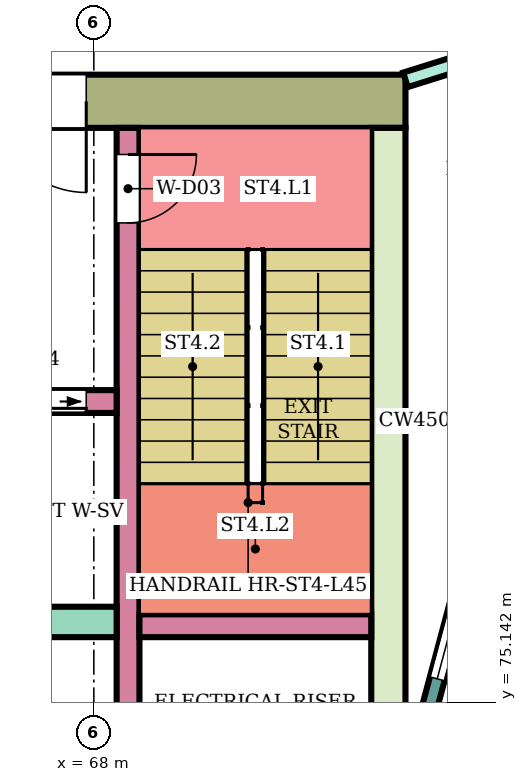
"""IFC4 building model, lengths in metres.
Left out: names, types, materials, properties, quantities, classifications, styles, units other than length and angle.
Written with IfcOpenShell. Run it as: python <this file> out.ifc"""

import sys

from ifc_helpers import new_model, si_unit, direction, frame, frame_2d, origin, place, context, subcontext, project, spatial, rectangle, extrude, element, fill, save


model = new_model("IFC4")
c1 = context("Model", 3, precision=1e-05, world=origin(), true_north=direction((0.0, 1.0)))
c2 = subcontext(c1, "Body", "Model", "MODEL_VIEW")
j1 = project(units=[si_unit("LENGTHUNIT", "METRE"), si_unit("PLANEANGLEUNIT", "RADIAN")], contexts=[c1])
p1 = place(None, origin())
s1 = spatial("IfcSite", under=j1, at=p1, CompositionType="ELEMENT")
p2 = place(p1, origin())
s2 = spatial("IfcBuilding", under=s1, at=p2, CompositionType="ELEMENT")
p3 = place(p2, frame((0.0, 0.0, 194.6)))
s3 = spatial("IfcBuildingStorey", under=s2, at=p3, CompositionType="ELEMENT", Elevation=194.6)
p4 = place(p3, frame((72.1, 83.05, 0.0), z_axis=(0.0, 0.0, 1.0), x_axis=(-1.0, 0.0, 0.0)))
e1 = element("IfcWall", 1, at=p4, inside=s3, PredefinedType="SHEAR", context=c2, shape_type="SweptSolid", body=[
    extrude(rectangle(XDim=14.8, YDim=0.7, at=frame_2d((7.4, 0.0))), origin(), (0.0, 0.0, 1.0), 3.78),
])
p5 = place(p4, frame((4.2, 0.0, 0.0)))
e2 = element("IfcOpeningElement", 2, at=p5, cuts=e1, PredefinedType="OPENING", context=c2, shape_type="SweptSolid", body=[
    extrude(rectangle(XDim=2.4, YDim=2.4, at=frame_2d((1.2, 1.2))), frame((0.0, 0.36, 0.0), z_axis=(0.0, -1.0, 0.0), x_axis=(1.0, 0.0, 0.0)), (0.0, 0.0, 1.0), 0.72),
])
p6 = place(p3, frame((71.875, 82.7, 0.0), z_axis=(0.0, 0.0, 1.0), x_axis=(0.0, -1.0, 0.0)))
e3 = element("IfcWall", 3, at=p6, inside=s3, PredefinedType="SHEAR", context=c2, shape_type="SweptSolid", body=[
    extrude(rectangle(XDim=7.7, YDim=0.45, at=frame_2d((3.85, 0.0))), origin(), (0.0, 0.0, 1.0), 3.78),
])
p7 = place(p3, frame((68.45, 82.7, 0.0), z_axis=(0.0, 0.0, 1.0), x_axis=(0.0, -1.0, 0.0)))
e4 = element("IfcWall", 4, at=p7, inside=s3, PredefinedType="SHEAR", context=c2, shape_type="SweptSolid", body=[
    extrude(rectangle(XDim=7.7, YDim=0.3, at=frame_2d((3.85, 0.0))), origin(), (0.0, 0.0, 1.0), 3.78),
])
p8 = place(p7, frame((0.35, 0.0, 0.0)))
e5 = element("IfcOpeningElement", 5, at=p8, cuts=e4, PredefinedType="OPENING", context=c2, shape_type="SweptSolid", body=[
    extrude(rectangle(XDim=0.9, YDim=2.1, at=frame_2d((0.45, 1.05))), frame((0.0, 0.16, 0.0), z_axis=(0.0, -1.0, 0.0), x_axis=(1.0, 0.0, 0.0)), (0.0, 0.0, 1.0), 0.32),
])
p9 = place(p3, frame((71.65, 76.15, 0.0), z_axis=(0.0, 0.0, 1.0), x_axis=(-1.0, 0.0, 0.0)))
e6 = element("IfcWall", 6, at=p9, inside=s3, PredefinedType="SHEAR", context=c2, shape_type="SweptSolid", body=[
    extrude(rectangle(XDim=3.05, YDim=0.3, at=frame_2d((1.525, 0.0))), origin(), (0.0, 0.0, 1.0), 3.78),
])
p10 = place(p3, frame((68.3, 76.2, 0.0), z_axis=(0.0, 0.0, 1.0), x_axis=(-1.0, 0.0, 0.0)))
e7 = element("IfcWall", 7, at=p10, inside=s3, PredefinedType="SHEAR", context=c2, shape_type="SweptSolid", body=[
    extrude(rectangle(XDim=11.0, YDim=0.4, at=frame_2d((5.5, 0.0))), origin(), (0.0, 0.0, 1.0), 3.78),
])
p11 = place(p3, frame((68.3, 79.1, 0.0), z_axis=(0.0, 0.0, 1.0), x_axis=(-1.0, 0.0, 0.0)))
e8 = element("IfcWall", 8, at=p11, inside=s3, PredefinedType="SHEAR", context=c2, shape_type="SweptSolid", body=[
    extrude(rectangle(XDim=11.0, YDim=0.3, at=frame_2d((5.5, 0.0))), origin(), (0.0, 0.0, 1.0), 3.78),
])
p12 = place(p11, frame((0.4, 0.0, 0.0)))
e9 = element("IfcOpeningElement", 9, at=p12, cuts=e8, PredefinedType="OPENING", context=c2, shape_type="SweptSolid", body=[
    extrude(rectangle(XDim=1.4, YDim=2.1, at=frame_2d((0.7, 1.05))), frame((0.0, 0.16, 0.0), z_axis=(0.0, -1.0, 0.0), x_axis=(1.0, 0.0, 0.0)), (0.0, 0.0, 1.0), 0.32),
])
p13 = place(p11, frame((3.0, 0.0, 0.0)))
e10 = element("IfcOpeningElement", 10, at=p13, cuts=e8, PredefinedType="OPENING", context=c2, shape_type="SweptSolid", body=[
    extrude(rectangle(XDim=1.2, YDim=2.1, at=frame_2d((0.6, 1.05))), frame((0.0, 0.16, 0.0), z_axis=(0.0, -1.0, 0.0), x_axis=(1.0, 0.0, 0.0)), (0.0, 0.0, 1.0), 0.32),
])
p14 = place(p11, frame((5.3, 0.0, 0.0)))
e11 = element("IfcOpeningElement", 11, at=p14, cuts=e8, PredefinedType="OPENING", context=c2, shape_type="SweptSolid", body=[
    extrude(rectangle(XDim=0.9, YDim=2.1, at=frame_2d((0.45, 1.05))), frame((0.0, 0.16, 0.0), z_axis=(0.0, -1.0, 0.0), x_axis=(1.0, 0.0, 0.0)), (0.0, 0.0, 1.0), 0.32),
])
p15 = place(p11, frame((8.3, 0.0, 0.0)))
e12 = element("IfcOpeningElement", 12, at=p15, cuts=e8, PredefinedType="OPENING", context=c2, shape_type="SweptSolid", body=[
    extrude(rectangle(XDim=0.9, YDim=2.1, at=frame_2d((0.45, 1.05))), frame((0.0, 0.16, 0.0), z_axis=(0.0, -1.0, 0.0), x_axis=(1.0, 0.0, 0.0)), (0.0, 0.0, 1.0), 0.32),
])
p16 = place(p3, frame((73.415, 78.802, 0.0), z_axis=(0.0, 0.0, 1.0), x_axis=(-0.258789828301, -0.965933654434, 0.0)))
e13 = element("IfcWall", 13, at=p16, inside=s3, PredefinedType="NOTDEFINED", context=c2, shape_type="SweptSolid", body=[
    extrude(rectangle(XDim=3.936, YDim=0.2, at=frame_2d((1.968, 0.0))), origin(), (0.0, 0.0, 1.0), 4.1),
])
p17 = place(p16, frame((0.468, 0.0, 0.9)))
e14 = element("IfcOpeningElement", 14, at=p17, cuts=e13, PredefinedType="OPENING", context=c2, shape_type="SweptSolid", body=[
    extrude(rectangle(XDim=3.0, YDim=2.3, at=frame_2d((1.5, 1.15))), frame((0.0, 0.11, 0.0), z_axis=(0.0, -1.0, 0.0), x_axis=(1.0, 0.0, 0.0)), (0.0, 0.0, 1.0), 0.22),
])
p18 = place(p3, frame((72.1, 83.332, 0.0), z_axis=(0.0, 0.0, 1.0), x_axis=(0.954233106619, 0.299063836383, 0.0)))
e15 = element("IfcWall", 15, at=p18, inside=s3, PredefinedType="PARTITIONING", context=c2, shape_type="SweptSolid", body=[
    extrude(rectangle(XDim=2.414, YDim=0.2, at=frame_2d((1.207, 0.0))), origin(), (0.0, 0.0, 1.0), 3.65),
])
p19 = place(p18, frame((0.762, 0.0, 0.0)))
e16 = element("IfcOpeningElement", 16, at=p19, cuts=e15, PredefinedType="OPENING", context=c2, shape_type="SweptSolid", body=[
    extrude(rectangle(XDim=0.9, YDim=2.1, at=frame_2d((0.45, 1.05))), frame((0.0, 0.11, 0.0), z_axis=(0.0, -1.0, 0.0), x_axis=(1.0, 0.0, 0.0)), (0.0, 0.0, 1.0), 0.22),
])
p20 = place(p17, origin())
e17 = element("IfcWindow", 17, at=p20, inside=s3, PartitioningType="SINGLE_PANEL", PredefinedType="WINDOW", context=c2, shape_type="SweptSolid", body=[
    extrude(rectangle(XDim=3.0, YDim=2.3, at=frame_2d((1.5, 1.15))), frame((0.0, 0.03, 0.0), z_axis=(0.0, -1.0, 0.0), x_axis=(1.0, 0.0, 0.0)), (0.0, 0.0, 1.0), 0.06),
])
fill(e14, e17)
p21 = place(p8, origin())
e18 = element("IfcDoor", 18, at=p21, inside=s3, OperationType="SINGLE_SWING_LEFT", PredefinedType="DOOR", context=c2, shape_type="SweptSolid", body=[
    extrude(rectangle(XDim=0.9, YDim=2.1, at=frame_2d((0.45, 1.05))), frame((0.0, 0.025, 0.0), z_axis=(0.0, -1.0, 0.0), x_axis=(1.0, 0.0, 0.0)), (0.0, 0.0, 1.0), 0.05),
])
fill(e5, e18)
p22 = place(p12, origin())
e19 = element("IfcDoor", 19, at=p22, inside=s3, OperationType="DOUBLE_DOOR_SLIDING", PredefinedType="DOOR", context=c2, shape_type="SweptSolid", body=[
    extrude(rectangle(XDim=1.4, YDim=2.1, at=frame_2d((0.7, 1.05))), frame((0.0, 0.025, 0.0), z_axis=(0.0, -1.0, 0.0), x_axis=(1.0, 0.0, 0.0)), (0.0, 0.0, 1.0), 0.05),
])
fill(e9, e19)
p23 = place(p5, origin())
e20 = element("IfcDoor", 20, at=p23, inside=s3, OperationType="DOUBLE_DOOR_SINGLE_SWING", PredefinedType="DOOR", context=c2, shape_type="SweptSolid", body=[
    extrude(rectangle(XDim=2.4, YDim=2.4, at=frame_2d((1.2, 1.2))), frame((0.0, 0.025, 0.0), z_axis=(0.0, -1.0, 0.0), x_axis=(1.0, 0.0, 0.0)), (0.0, 0.0, 1.0), 0.05),
])
fill(e2, e20)
save(model, sys.argv[1])
